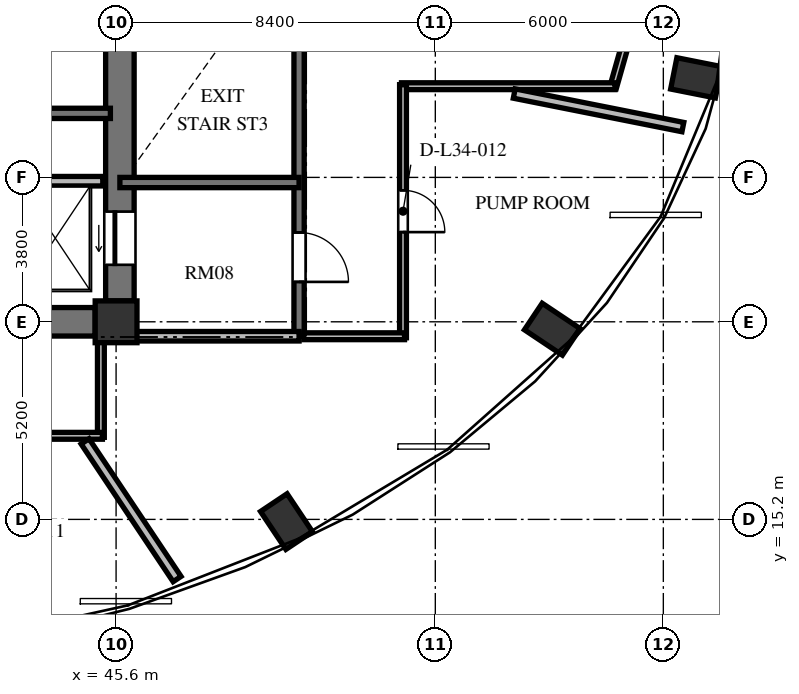
"""IFC4 building model, lengths in metres.
Left out: names, types, materials, properties, quantities, classifications, styles, units other than length and angle.
Written with IfcOpenShell. Run it as: python <this file> out.ifc"""

import sys

from ifc_helpers import new_model, si_unit, direction, frame, frame_2d, origin, origin_2d, place, context, subcontext, project, spatial, rectangle, extrude, element, fill, save


model = new_model("IFC4")
c1 = context("Model", 3, precision=1e-05, world=origin(), true_north=direction((0.0, 1.0)))
c2 = subcontext(c1, "Body", "Model", "MODEL_VIEW")
j1 = project(units=[si_unit("LENGTHUNIT", "METRE"), si_unit("PLANEANGLEUNIT", "RADIAN")], contexts=[c1])
p1 = place(None, origin())
s1 = spatial("IfcSite", under=j1, at=p1, CompositionType="ELEMENT")
p2 = place(p1, origin())
s2 = spatial("IfcBuilding", under=s1, at=p2, CompositionType="ELEMENT")
p3 = place(p2, frame((0.0, 0.0, 132.816)))
s3 = spatial("IfcBuildingStorey", under=s2, at=p3, CompositionType="ELEMENT", Elevation=132.816)
for number, where, z_axis, x_axis in (
    (1, (50.084, 15.143, 0.0), (0.0, 0.0, 1.0), (0.556, -0.831, 0.0)),
    (2, (57.078, 20.205, 0.0), (0.0, 0.0, 1.0), (0.831, -0.556, 0.0)),
    (3, (60.863, 26.82, 0.0), (0.0, 0.0, 1.0), (0.981, -0.195, 0.0)),
):
    element("IfcColumn", number, at=place(p3, frame(where, z_axis=z_axis, x_axis=x_axis)), inside=s3, PredefinedType="COLUMN", context=c2, shape_type="SweptSolid", body=[
        extrude(rectangle(XDim=1.2, YDim=0.84, at=origin_2d()), origin(), (0.0, 0.0, 1.0), 5.472),
    ])
p4 = place(p3, frame((45.6, 20.4, 0.0), z_axis=(0.0, 0.0, 1.0), x_axis=(1.0, 0.0, 0.0)))
e4 = element("IfcColumn", 4, at=p4, inside=s3, PredefinedType="COLUMN", context=c2, shape_type="SweptSolid", body=[
    extrude(rectangle(XDim=1.1, YDim=1.1, at=origin_2d()), origin(), (0.0, 0.0, 1.0), 5.472),
])
p5 = place(p3, frame((45.7, 20.95, 0.0), z_axis=(0.0, 0.0, 1.0), x_axis=(0.0, 1.0, 0.0)))
e5 = element("IfcWall", 5, at=p5, inside=s3, PredefinedType="SHEAR", context=c2, shape_type="SweptSolid", body=[
    extrude(rectangle(XDim=14.1, YDim=0.75, at=frame_2d((7.05, 0.0))), origin(), (0.0, 0.0, 1.0), 5.472),
])
p6 = place(p5, frame((11.75, 0.0, 0.0)))
e6 = element("IfcOpeningElement", 6, at=p6, cuts=e5, PredefinedType="OPENING", context=c2, shape_type="SweptSolid", body=[
    extrude(rectangle(XDim=1.4, YDim=2.3, at=frame_2d((0.7, 1.15))), frame((0.0, 0.385, 0.0), z_axis=(0.0, -1.0, 0.0), x_axis=(1.0, 0.0, 0.0)), (0.0, 0.0, 1.0), 0.77),
])
p7 = place(p5, frame((0.95, 0.0, 0.0)))
e7 = element("IfcOpeningElement", 7, at=p7, cuts=e5, PredefinedType="OPENING", context=c2, shape_type="SweptSolid", body=[
    extrude(rectangle(XDim=1.4, YDim=2.3, at=frame_2d((0.7, 1.15))), frame((0.0, 0.385, 0.0), z_axis=(0.0, -1.0, 0.0), x_axis=(1.0, 0.0, 0.0)), (0.0, 0.0, 1.0), 0.77),
])
p8 = place(p3, frame((39.675, 20.4, 0.0), z_axis=(0.0, 0.0, 1.0), x_axis=(1.0, 0.0, 0.0)))
e8 = element("IfcWall", 8, at=p8, inside=s3, PredefinedType="SHEAR", context=c2, shape_type="SweptSolid", body=[
    extrude(rectangle(XDim=5.375, YDim=0.75, at=frame_2d((2.688, 0.0))), origin(), (0.0, 0.0, 1.0), 5.472),
])
p9 = place(p3, frame((37.465, 25.885, 0.0), z_axis=(0.0, 0.0, 1.0), x_axis=(1.0, 0.0, 0.0)))
e9 = element("IfcWall", 9, at=p9, inside=s3, PredefinedType="SHEAR", context=c2, shape_type="SweptSolid", body=[
    extrude(rectangle(XDim=7.985, YDim=0.27, at=frame_2d((3.992, 0.0))), origin(), (0.0, 0.0, 1.0), 5.472),
])
p10 = place(p3, frame((42.95, 24.1, 0.0), z_axis=(0.0, 0.0, 1.0), x_axis=(1.0, 0.0, 0.0)))
e10 = element("IfcWall", 10, at=p10, inside=s3, PredefinedType="SOLIDWALL", context=c2, shape_type="SweptSolid", body=[
    extrude(rectangle(XDim=2.3, YDim=0.25, at=frame_2d((1.15, 0.0))), origin(), (0.0, 0.0, 1.0), 5.022),
])
p11 = place(p3, frame((50.415, 35.845, 0.0), z_axis=(0.0, 0.0, 1.0), x_axis=(0.0, -1.0, 0.0)))
e11 = element("IfcWall", 11, at=p11, inside=s3, PredefinedType="SHEAR", context=c2, shape_type="SweptSolid", body=[
    extrude(rectangle(XDim=15.825, YDim=0.27, at=frame_2d((7.913, 0.0))), origin(), (0.0, 0.0, 1.0), 5.472),
])
p12 = place(p11, frame((4.445, 0.0, 0.0)))
e12 = element("IfcOpeningElement", 12, at=p12, cuts=e11, PredefinedType="OPENING", context=c2, shape_type="SweptSolid", body=[
    extrude(rectangle(XDim=1.2, YDim=2.15, at=frame_2d((0.6, 1.075))), frame((0.0, 0.145, 0.0), z_axis=(0.0, -1.0, 0.0), x_axis=(1.0, 0.0, 0.0)), (0.0, 0.0, 1.0), 0.29),
])
p13 = place(p11, frame((1.295, 0.0, 0.0)))
e13 = element("IfcOpeningElement", 13, at=p13, cuts=e11, PredefinedType="OPENING", context=c2, shape_type="SweptSolid", body=[
    extrude(rectangle(XDim=1.3, YDim=2.2, at=frame_2d((0.65, 1.1))), frame((0.0, 0.145, 0.0), z_axis=(0.0, -1.0, 0.0), x_axis=(1.0, 0.0, 0.0)), (0.0, 0.0, 1.0), 0.29),
])
p14 = place(p11, frame((13.095, 0.0, 0.0)))
e14 = element("IfcOpeningElement", 14, at=p14, cuts=e11, PredefinedType="OPENING", context=c2, shape_type="SweptSolid", body=[
    extrude(rectangle(XDim=1.3, YDim=2.2, at=frame_2d((0.65, 1.1))), frame((0.0, 0.145, 0.0), z_axis=(0.0, -1.0, 0.0), x_axis=(1.0, 0.0, 0.0)), (0.0, 0.0, 1.0), 0.29),
])
p15 = place(p3, frame((45.7, 24.065, 0.0), z_axis=(0.0, 0.0, 1.0), x_axis=(1.0, 0.0, 0.0)))
e15 = element("IfcWall", 15, at=p15, inside=s3, PredefinedType="SHEAR", context=c2, shape_type="SweptSolid", body=[
    extrude(rectangle(XDim=4.715, YDim=0.27, at=frame_2d((2.357, 0.0))), origin(), (0.0, 0.0, 1.0), 5.472),
])
p16 = place(p3, frame((45.7, 20.02, 0.0), z_axis=(0.0, 0.0, 1.0), x_axis=(1.0, 0.0, 0.0)))
e16 = element("IfcWall", 16, at=p16, inside=s3, PredefinedType="SOLIDWALL", context=c2, shape_type="SweptSolid", body=[
    extrude(rectangle(XDim=4.715, YDim=0.25, at=frame_2d((2.357, 0.0))), origin(), (0.0, 0.0, 1.0), 5.022),
])
p17 = place(p3, frame((59.494, 29.438, 0.0), z_axis=(0.0, 0.0, 1.0), x_axis=(-0.273222154729, -0.961950962453, 0.0)))
e17 = element("IfcWall", 17, at=p17, inside=s3, PredefinedType="PARTITIONING", context=c2, shape_type="SweptSolid", body=[
    extrude(rectangle(XDim=2.991, YDim=0.18, at=frame_2d((1.495, 0.0))), origin(), (0.0, 0.0, 1.0), 4.107),
])
p18 = place(p3, frame((58.727, 26.6, 0.0), z_axis=(0.0, 0.0, 1.0), x_axis=(-1.0, 0.0, 0.0)))
e18 = element("IfcWall", 18, at=p18, inside=s3, PredefinedType="PARTITIONING", context=c2, shape_type="SweptSolid", body=[
    extrude(rectangle(XDim=5.617, YDim=0.18, at=frame_2d((2.809, 0.0))), origin(), (0.0, 0.0, 1.0), 5.022),
])
p19 = place(p3, frame((53.15, 26.64, 0.0), z_axis=(0.0, 0.0, 1.0), x_axis=(0.0, -1.0, 0.0)))
e19 = element("IfcWall", 19, at=p19, inside=s3, PredefinedType="PARTITIONING", context=c2, shape_type="SweptSolid", body=[
    extrude(rectangle(XDim=6.66, YDim=0.18, at=frame_2d((3.33, 0.0))), origin(), (0.0, 0.0, 1.0), 5.022),
])
p20 = place(p19, frame((2.78, 0.0, 0.0)))
e20 = element("IfcOpeningElement", 20, at=p20, cuts=e19, PredefinedType="OPENING", context=c2, shape_type="SweptSolid", body=[
    extrude(rectangle(XDim=1.1, YDim=2.15, at=frame_2d((0.55, 1.075))), frame((0.0, 0.1, 0.0), z_axis=(0.0, -1.0, 0.0), x_axis=(1.0, 0.0, 0.0)), (0.0, 0.0, 1.0), 0.2),
])
p21 = place(p3, frame((53.19, 20.02, 0.0), z_axis=(0.0, 0.0, 1.0), x_axis=(-1.0, 0.0, 0.0)))
e21 = element("IfcWall", 21, at=p21, inside=s3, PredefinedType="PARTITIONING", context=c2, shape_type="SweptSolid", body=[
    extrude(rectangle(XDim=2.65, YDim=0.18, at=frame_2d((1.325, 0.0))), origin(), (0.0, 0.0, 1.0), 3.607),
])
p22 = place(p3, frame((45.2, 19.91, 0.0), z_axis=(0.0, 0.0, 1.0), x_axis=(0.0, -1.0, 0.0)))
e22 = element("IfcWall", 22, at=p22, inside=s3, PredefinedType="PARTITIONING", context=c2, shape_type="SweptSolid", body=[
    extrude(rectangle(XDim=2.55, YDim=0.18, at=frame_2d((1.275, 0.0))), origin(), (0.0, 0.0, 1.0), 5.022),
])
p23 = place(p3, frame((45.24, 17.4, 0.0), z_axis=(0.0, 0.0, 1.0), x_axis=(-1.0, 0.0, 0.0)))
e23 = element("IfcWall", 23, at=p23, inside=s3, PredefinedType="PARTITIONING", context=c2, shape_type="SweptSolid", body=[
    extrude(rectangle(XDim=21.93, YDim=0.18, at=frame_2d((10.965, 0.0))), origin(), (0.0, 0.0, 1.0), 4.647),
])
p24 = place(p23, frame((17.659, 0.0, 0.0)))
e24 = element("IfcOpeningElement", 24, at=p24, cuts=e23, PredefinedType="OPENING", context=c2, shape_type="SweptSolid", body=[
    extrude(rectangle(XDim=1.3, YDim=2.2, at=frame_2d((0.65, 1.1))), frame((0.0, 0.1, 0.0), z_axis=(0.0, -1.0, 0.0), x_axis=(1.0, 0.0, 0.0)), (0.0, 0.0, 1.0), 0.2),
])
p25 = place(p23, frame((13.035, 0.0, 0.0)))
e25 = element("IfcOpeningElement", 25, at=p25, cuts=e23, PredefinedType="OPENING", context=c2, shape_type="SweptSolid", body=[
    extrude(rectangle(XDim=1.1, YDim=2.15, at=frame_2d((0.55, 1.075))), frame((0.0, 0.1, 0.0), z_axis=(0.0, -1.0, 0.0), x_axis=(1.0, 0.0, 0.0)), (0.0, 0.0, 1.0), 0.2),
])
p26 = place(p23, frame((8.409, 0.0, 0.0)))
e26 = element("IfcOpeningElement", 26, at=p26, cuts=e23, PredefinedType="OPENING", context=c2, shape_type="SweptSolid", body=[
    extrude(rectangle(XDim=1.1, YDim=2.15, at=frame_2d((0.55, 1.075))), frame((0.0, 0.1, 0.0), z_axis=(0.0, -1.0, 0.0), x_axis=(1.0, 0.0, 0.0)), (0.0, 0.0, 1.0), 0.2),
])
p27 = place(p23, frame((2.831, 0.0, 0.0)))
e27 = element("IfcOpeningElement", 27, at=p27, cuts=e23, PredefinedType="OPENING", context=c2, shape_type="SweptSolid", body=[
    extrude(rectangle(XDim=1.3, YDim=2.2, at=frame_2d((0.65, 1.1))), frame((0.0, 0.1, 0.0), z_axis=(0.0, -1.0, 0.0), x_axis=(1.0, 0.0, 0.0)), (0.0, 0.0, 1.0), 0.2),
])
p28 = place(p3, frame((44.784, 17.253, 0.0), z_axis=(0.0, 0.0, 1.0), x_axis=(0.555553222681, -0.831480977996, 0.0)))
e28 = element("IfcWall", 28, at=p28, inside=s3, PredefinedType="SOLIDWALL", context=c2, shape_type="SweptSolid", body=[
    extrude(rectangle(XDim=4.358, YDim=0.25, at=frame_2d((2.179, 0.0))), origin(), (0.0, 0.0, 1.0), 5.022),
])
p29 = place(p3, frame((56.077, 26.406, 0.0), z_axis=(0.0, 0.0, 1.0), x_axis=(0.98077940709, -0.195119846833, 0.0)))
e29 = element("IfcWall", 29, at=p29, inside=s3, PredefinedType="SOLIDWALL", context=c2, shape_type="SweptSolid", body=[
    extrude(rectangle(XDim=4.524, YDim=0.25, at=frame_2d((2.262, 0.0))), origin(), (0.0, 0.0, 1.0), 5.022),
])
p30 = place(p7, origin())
e30 = element("IfcDoor", 30, at=p30, inside=s3, OperationType="SLIDING_TO_LEFT", PredefinedType="DOOR", context=c2, shape_type="SweptSolid", body=[
    extrude(rectangle(XDim=1.4, YDim=2.3, at=frame_2d((0.7, 1.15))), frame((0.0, 0.025, 0.0), z_axis=(0.0, -1.0, 0.0), x_axis=(1.0, 0.0, 0.0)), (0.0, 0.0, 1.0), 0.05),
])
fill(e7, e30)
p31 = place(p14, origin())
e31 = element("IfcDoor", 31, at=p31, inside=s3, OperationType="SINGLE_SWING_RIGHT", PredefinedType="DOOR", context=c2, shape_type="SweptSolid", body=[
    extrude(rectangle(XDim=1.3, YDim=2.2, at=frame_2d((0.65, 1.1))), frame((0.0, 0.025, 0.0), z_axis=(0.0, -1.0, 0.0), x_axis=(1.0, 0.0, 0.0)), (0.0, 0.0, 1.0), 0.05),
])
fill(e14, e31)
p32 = place(p20, origin())
e32 = element("IfcDoor", 32, at=p32, inside=s3, OperationType="SINGLE_SWING_RIGHT", PredefinedType="DOOR", context=c2, shape_type="SweptSolid", body=[
    extrude(rectangle(XDim=1.1, YDim=2.15, at=frame_2d((0.55, 1.075))), frame((0.0, 0.025, 0.0), z_axis=(0.0, -1.0, 0.0), x_axis=(1.0, 0.0, 0.0)), (0.0, 0.0, 1.0), 0.05),
])
fill(e20, e32)
save(model, sys.argv[1])
